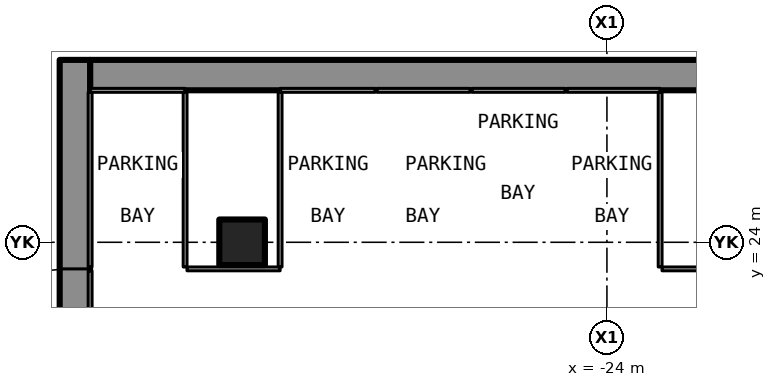
"""IFC4 building model, lengths in metres.
Left out: names, types, materials, properties, quantities, classifications, styles, units other than length and angle.
Written with IfcOpenShell. Run it as: python <this file> out.ifc"""

import sys

from ifc_helpers import new_model, si_unit, direction, frame, frame_2d, origin, origin_2d, place, context, subcontext, project, spatial, rectangle, hollow_rectangle, extrude, element, fill, save


model = new_model("IFC4")
c1 = context("Model", 3, precision=1e-05, world=origin(), true_north=direction((0.0, 1.0)))
c2 = subcontext(c1, "Body", "Model", "MODEL_VIEW")
j1 = project(units=[si_unit("LENGTHUNIT", "METRE"), si_unit("PLANEANGLEUNIT", "RADIAN")], contexts=[c1])
p1 = place(None, origin())
s1 = spatial("IfcSite", under=j1, at=p1, CompositionType="ELEMENT")
p2 = place(p1, origin())
s2 = spatial("IfcBuilding", under=s1, at=p2, CompositionType="ELEMENT")
p3 = place(p2, frame((0.0, 0.0, -5.0)))
s3 = spatial("IfcBuildingStorey", under=s2, at=p3, CompositionType="ELEMENT", Elevation=-5.0)
p4 = place(p3, frame((-33.6, 24.0, -0.3), z_axis=(0.0, 0.0, 1.0), x_axis=(1.0, 0.0, 0.0)))
e1 = element("IfcColumn", 1, at=p4, inside=s3, PredefinedType="COLUMN", context=c2, shape_type="SweptSolid", body=[
    extrude(hollow_rectangle(XDim=1.2, YDim=1.2, WallThickness=0.07, at=origin_2d()), origin(), (0.0, 0.0, 1.0), 5.0),
])
p5 = place(p3, frame((-37.6, 28.4, -0.3), z_axis=(0.0, 0.0, 1.0), x_axis=(1.0, 0.0, 0.0)))
e2 = element("IfcWall", 2, at=p5, inside=s3, PredefinedType="SOLIDWALL", context=c2, shape_type="SweptSolid", body=[
    extrude(rectangle(XDim=75.2, YDim=0.8, at=frame_2d((37.6, 0.0))), origin(), (0.0, 0.0, 1.0), 4.378),
])
p6 = place(p3, frame((-38.0, -38.4, -0.3), z_axis=(0.0, 0.0, 1.0), x_axis=(0.0, 1.0, 0.0)))
e3 = element("IfcWall", 3, at=p6, inside=s3, PredefinedType="SOLIDWALL", context=c2, shape_type="SweptSolid", body=[
    extrude(rectangle(XDim=67.2, YDim=0.8, at=frame_2d((33.6, 0.0))), origin(), (0.0, 0.0, 1.0), 4.378),
])
p7 = place(p6, frame((55.7, 0.0, 0.0)))
e4 = element("IfcOpeningElement", 4, at=p7, cuts=e3, PredefinedType="OPENING", context=c2, shape_type="SweptSolid", body=[
    extrude(rectangle(XDim=6.0, YDim=2.5, at=frame_2d((3.0, 1.25))), frame((0.0, 0.412, 0.0), z_axis=(0.0, -1.0, 0.0), x_axis=(1.0, 0.0, 0.0)), (0.0, 0.0, 1.0), 0.824),
])
p8 = place(p2, frame((0.0, 0.0, -10.0)))
s4 = spatial("IfcBuildingStorey", under=s2, at=p8, CompositionType="ELEMENT", Elevation=-10.0)
p9 = place(p8, frame((-46.9, 24.05, 4.7), z_axis=(0.0, 0.0, 1.0), x_axis=(1.0, 0.0, 0.0)))
e5 = element("IfcWall", 5, at=p9, inside=s4, PredefinedType="SOLIDWALL", context=c2, shape_type="SweptSolid", body=[
    extrude(rectangle(XDim=8.5, YDim=0.5, at=frame_2d((4.25, 0.0))), origin(), (0.0, 0.0, 1.0), 5.45),
])
p10 = place(p3, frame((-35.05, 23.3, 0.0), z_axis=(0.0, 0.0, 1.0), x_axis=(1.0, 0.0, 0.0)))
e6 = element("IfcWall", 6, at=p10, inside=s3, PredefinedType="PARTITIONING", context=c2, shape_type="SweptSolid", body=[
    extrude(rectangle(XDim=2.45, YDim=0.1, at=frame_2d((1.225, 0.0))), origin(), (0.0, 0.0, 1.0), 4.7),
])
p11 = place(p3, frame((-22.55, 23.3, 0.0), z_axis=(0.0, 0.0, 1.0), x_axis=(1.0, 0.0, 0.0)))
e7 = element("IfcWall", 7, at=p11, inside=s3, PredefinedType="PARTITIONING", context=c2, shape_type="SweptSolid", body=[
    extrude(rectangle(XDim=4.95, YDim=0.1, at=frame_2d((2.475, 0.0))), origin(), (0.0, 0.0, 1.0), 4.7),
])
for number, where, z_axis, x_axis in (
    (8, (-37.6, 28.0, 0.0), (0.0, 0.0, 1.0), (1.0, 0.0, 0.0)),
    (9, (-32.6, 28.0, 0.0), (0.0, 0.0, 1.0), (1.0, 0.0, 0.0)),
):
    element("IfcWall", number, at=place(p3, frame(where, z_axis=z_axis, x_axis=x_axis)), inside=s3, PredefinedType="PARTITIONING", context=c2, shape_type="SweptSolid", body=[
        extrude(rectangle(XDim=2.5, YDim=0.1, at=frame_2d((1.25, 0.0))), origin(), (0.0, 0.0, 1.0), 4.7),
    ])
for number, where, z_axis, x_axis in (
    (10, (-30.05, 28.0, 0.0), (0.0, 0.0, 1.0), (1.0, 0.0, 0.0)),
    (11, (-27.55, 28.0, 0.0), (0.0, 0.0, 1.0), (1.0, 0.0, 0.0)),
    (12, (-25.05, 28.0, 0.0), (0.0, 0.0, 1.0), (1.0, 0.0, 0.0)),
):
    element("IfcWall", number, at=place(p3, frame(where, z_axis=z_axis, x_axis=x_axis)), inside=s3, PredefinedType="PARTITIONING", context=c2, shape_type="SweptSolid", body=[
        extrude(rectangle(XDim=2.45, YDim=0.1, at=frame_2d((1.225, 0.0))), origin(), (0.0, 0.0, 1.0), 4.7),
    ])
p12 = place(p3, frame((-37.6, 17.35, 0.0), z_axis=(0.0, 0.0, 1.0), x_axis=(0.0, 1.0, 0.0)))
e13 = element("IfcWall", 13, at=p12, inside=s3, PredefinedType="PARTITIONING", context=c2, shape_type="SweptSolid", body=[
    extrude(rectangle(XDim=5.9, YDim=0.1, at=frame_2d((2.95, 0.0))), origin(), (0.0, 0.0, 1.0), 4.7),
])
for number, where, z_axis, x_axis in (
    (14, (-37.6, 23.35, 0.0), (0.0, 0.0, 1.0), (0.0, 1.0, 0.0)),
    (15, (-35.1, 23.35, 0.0), (0.0, 0.0, 1.0), (0.0, 1.0, 0.0)),
    (16, (-32.6, 23.35, 0.0), (0.0, 0.0, 1.0), (0.0, 1.0, 0.0)),
    (17, (-22.6, 23.35, 0.0), (0.0, 0.0, 1.0), (0.0, 1.0, 0.0)),
):
    element("IfcWall", number, at=place(p3, frame(where, z_axis=z_axis, x_axis=x_axis)), inside=s3, PredefinedType="PARTITIONING", context=c2, shape_type="SweptSolid", body=[
        extrude(rectangle(XDim=4.6, YDim=0.1, at=frame_2d((2.3, 0.0))), origin(), (0.0, 0.0, 1.0), 4.7),
    ])
p13 = place(p7, origin())
e18 = element("IfcDoor", 18, at=p13, inside=s3, OperationType="ROLLINGUP", PredefinedType="GATE", context=c2, shape_type="SweptSolid", body=[
    extrude(rectangle(XDim=6.0, YDim=2.5, at=frame_2d((3.0, 1.25))), frame((0.0, 0.025, 0.0), z_axis=(0.0, -1.0, 0.0), x_axis=(1.0, 0.0, 0.0)), (0.0, 0.0, 1.0), 0.05),
])
fill(e4, e18)
save(model, sys.argv[1])
